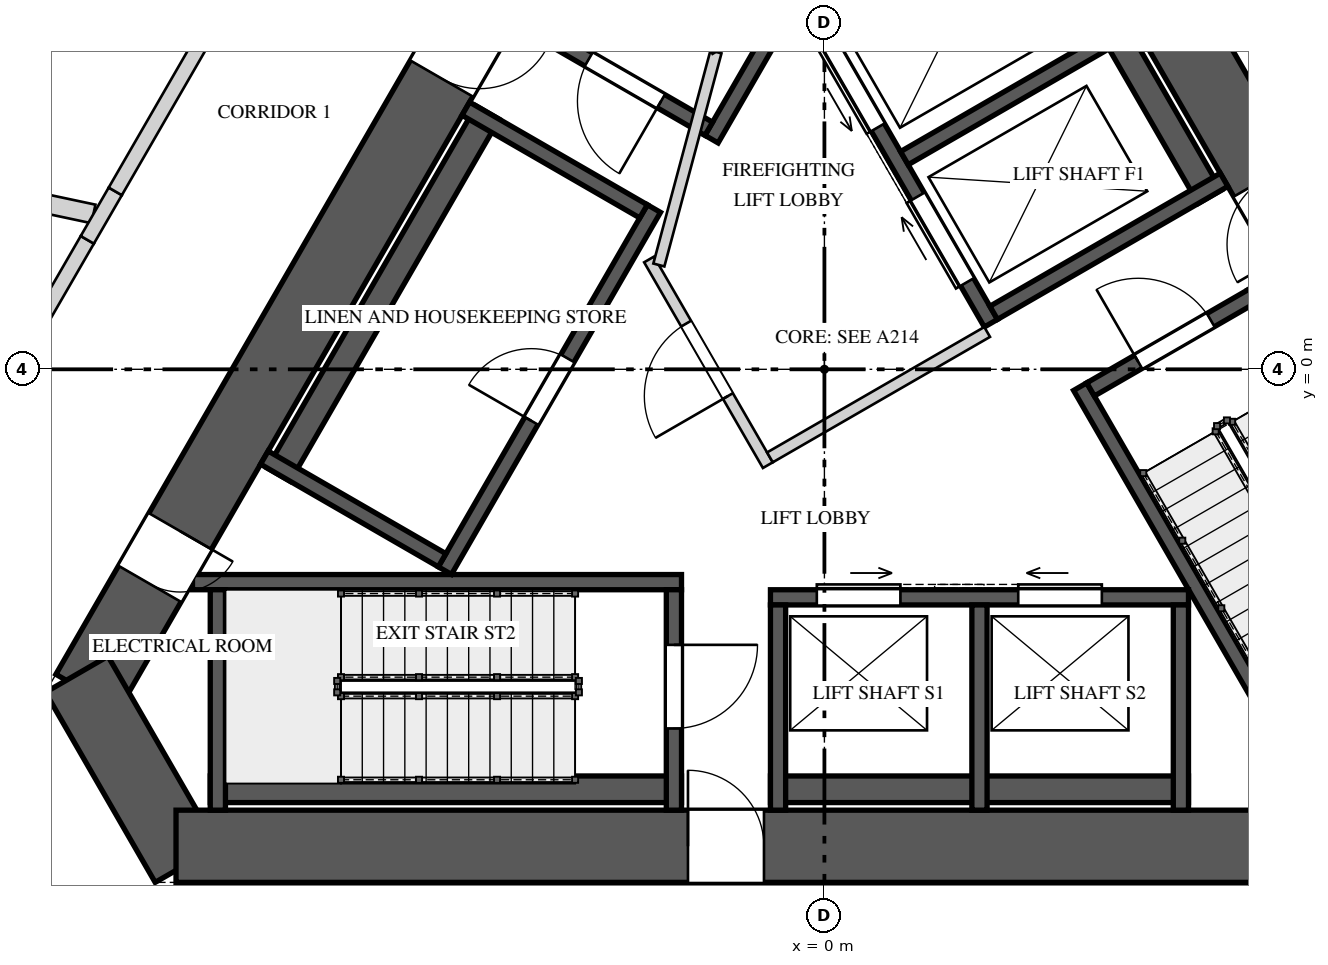
"""IFC4 building model, lengths in metres.
Left out: names, types, materials, properties, quantities, classifications, styles, units other than length and angle.
Written with IfcOpenShell. Run it as: python <this file> out.ifc"""

import sys

from ifc_helpers import new_model, si_unit, direction, frame, frame_2d, origin, place, context, subcontext, project, spatial, rectangle, extrude, element, fill, save


model = new_model("IFC4")
c1 = context("Model", 3, precision=1e-05, world=origin(), true_north=direction((0.0, 1.0)))
c2 = subcontext(c1, "Body", "Model", "MODEL_VIEW")
j1 = project(units=[si_unit("LENGTHUNIT", "METRE"), si_unit("PLANEANGLEUNIT", "RADIAN")], contexts=[c1])
p1 = place(None, origin())
s1 = spatial("IfcSite", under=j1, at=p1, CompositionType="ELEMENT")
p2 = place(p1, origin())
s2 = spatial("IfcBuilding", under=s1, at=p2, CompositionType="ELEMENT")
p3 = place(p2, frame((0.0, 0.0, 88.4)))
s3 = spatial("IfcBuildingStorey", under=s2, at=p3, CompositionType="ELEMENT", Elevation=88.4)
p4 = place(p3, frame((-1.169, 10.525, 0.0), z_axis=(0.0, 0.0, 1.0), x_axis=(-0.499999102847, -0.866025921755, 0.0)))
e1 = element("IfcWall", 1, at=p4, inside=s3, PredefinedType="SHEAR", context=c2, shape_type="SweptSolid", body=[
    extrude(rectangle(XDim=17.061, YDim=0.95, at=frame_2d((8.53, 0.0))), origin(), (0.0, 0.0, 1.0), 4.0),
])
p5 = place(p4, frame((6.735, 0.0, 0.0)))
e2 = element("IfcOpeningElement", 2, at=p5, cuts=e1, PredefinedType="OPENING", context=c2, shape_type="SweptSolid", body=[
    extrude(rectangle(XDim=1.0, YDim=2.4, at=frame_2d((0.5, 1.2))), frame((0.0, 0.485, 0.0), z_axis=(0.0, -1.0, 0.0), x_axis=(1.0, 0.0, 0.0)), (0.0, 0.0, 1.0), 0.97),
])
p6 = place(p4, frame((14.613, 0.0, 0.0)))
e3 = element("IfcOpeningElement", 3, at=p6, cuts=e1, PredefinedType="OPENING", context=c2, shape_type="SweptSolid", body=[
    extrude(rectangle(XDim=0.8, YDim=2.1, at=frame_2d((0.4, 1.05))), frame((0.0, 0.485, 0.0), z_axis=(0.0, -1.0, 0.0), x_axis=(1.0, 0.0, 0.0)), (0.0, 0.0, 1.0), 0.97),
])
p7 = place(p3, frame((-9.837, -4.012, 0.0), z_axis=(0.0, 0.0, 1.0), x_axis=(0.499995765644, -0.866027848477, 0.0)))
e4 = element("IfcWall", 4, at=p7, inside=s3, PredefinedType="SHEAR", context=c2, shape_type="SweptSolid", body=[
    extrude(rectangle(XDim=2.887, YDim=0.95, at=frame_2d((1.443, 0.0))), origin(), (0.0, 0.0, 1.0), 4.0),
])
p8 = place(p3, frame((-8.531, -6.275, 0.0), z_axis=(0.0, 0.0, 1.0), x_axis=(1.0, 0.0, 0.0)))
e5 = element("IfcWall", 5, at=p8, inside=s3, PredefinedType="SHEAR", context=c2, shape_type="SweptSolid", body=[
    extrude(rectangle(XDim=17.061, YDim=0.95, at=frame_2d((8.531, 0.0))), origin(), (0.0, 0.0, 1.0), 4.0),
])
p9 = place(p8, frame((6.735, 0.0, 0.0)))
e6 = element("IfcOpeningElement", 6, at=p9, cuts=e5, PredefinedType="OPENING", context=c2, shape_type="SweptSolid", body=[
    extrude(rectangle(XDim=1.0, YDim=2.4, at=frame_2d((0.5, 1.2))), frame((0.0, 0.485, 0.0), z_axis=(0.0, -1.0, 0.0), x_axis=(1.0, 0.0, 0.0)), (0.0, 0.0, 1.0), 0.97),
])
p10 = place(p3, frame((9.699, -4.25, 0.0), z_axis=(0.0, 0.0, 1.0), x_axis=(-0.499999102847, 0.866025921755, 0.0)))
e7 = element("IfcWall", 7, at=p10, inside=s3, PredefinedType="SHEAR", context=c2, shape_type="SweptSolid", body=[
    extrude(rectangle(XDim=17.061, YDim=0.95, at=frame_2d((8.53, 0.0))), origin(), (0.0, 0.0, 1.0), 4.0),
])
p11 = place(p10, frame((6.805, 0.0, 0.0)))
e8 = element("IfcOpeningElement", 8, at=p11, cuts=e7, PredefinedType="OPENING", context=c2, shape_type="SweptSolid", body=[
    extrude(rectangle(XDim=1.0, YDim=2.4, at=frame_2d((0.5, 1.2))), frame((0.0, 0.485, 0.0), z_axis=(0.0, -1.0, 0.0), x_axis=(1.0, 0.0, 0.0)), (0.0, 0.0, 1.0), 0.97),
])
p12 = place(p3, frame((1.732, 8.6, 0.0), z_axis=(0.0, 0.0, 1.0), x_axis=(-0.499975376872, -0.866039619487, 0.0)))
e9 = element("IfcWall", 9, at=p12, inside=s3, PredefinedType="SOLIDWALL", context=c2, shape_type="SweptSolid", body=[
    extrude(rectangle(XDim=6.434, YDim=0.2, at=frame_2d((3.217, 0.0))), origin(), (0.0, 0.0, 1.0), 3.65),
])
p13 = place(p3, frame((-1.521, 3.165, 0.0), z_axis=(0.0, 0.0, 1.0), x_axis=(-0.866032775405, 0.499987231761, 0.0)))
e10 = element("IfcWall", 10, at=p13, inside=s3, PredefinedType="SOLIDWALL", context=c2, shape_type="SweptSolid", body=[
    extrude(rectangle(XDim=2.9, YDim=0.2, at=frame_2d((1.45, 0.0))), origin(), (0.0, 0.0, 1.0), 3.65),
])
p14 = place(p13, frame((0.725, 0.0, 0.0)))
e11 = element("IfcOpeningElement", 11, at=p14, cuts=e10, PredefinedType="OPENING", context=c2, shape_type="SweptSolid", body=[
    extrude(rectangle(XDim=1.1, YDim=2.4, at=frame_2d((0.55, 1.2))), frame((0.0, 0.11, 0.0), z_axis=(0.0, -1.0, 0.0), x_axis=(1.0, 0.0, 0.0)), (0.0, 0.0, 1.0), 0.22),
])
p15 = place(p3, frame((-8.08, -5.525, 0.0), z_axis=(0.0, 0.0, 1.0), x_axis=(1.0, 0.0, 0.0)))
e12 = element("IfcWall", 12, at=p15, inside=s3, PredefinedType="SOLIDWALL", context=c2, shape_type="SweptSolid", body=[
    extrude(rectangle(XDim=6.2, YDim=0.35, at=frame_2d((3.1, 0.0))), origin(), (0.0, 0.0, 1.0), 3.65),
])
p16 = place(p3, frame((-8.314, -2.8, 0.0), z_axis=(0.0, 0.0, 1.0), x_axis=(1.0, 0.0, 0.0)))
e13 = element("IfcWall", 13, at=p16, inside=s3, PredefinedType="SOLIDWALL", context=c2, shape_type="SweptSolid", body=[
    extrude(rectangle(XDim=6.434, YDim=0.2, at=frame_2d((3.217, 0.0))), origin(), (0.0, 0.0, 1.0), 3.65),
])
p17 = place(p3, frame((-7.98, -2.9, 0.0), z_axis=(0.0, 0.0, 1.0), x_axis=(0.0, -1.0, 0.0)))
e14 = element("IfcWall", 14, at=p17, inside=s3, PredefinedType="SOLIDWALL", context=c2, shape_type="SweptSolid", body=[
    extrude(rectangle(XDim=2.9, YDim=0.2, at=frame_2d((1.45, 0.0))), origin(), (0.0, 0.0, 1.0), 3.65),
])
p18 = place(p3, frame((-1.98, -2.9, 0.0), z_axis=(0.0, 0.0, 1.0), x_axis=(0.0, -1.0, 0.0)))
e15 = element("IfcWall", 15, at=p18, inside=s3, PredefinedType="SOLIDWALL", context=c2, shape_type="SweptSolid", body=[
    extrude(rectangle(XDim=2.9, YDim=0.2, at=frame_2d((1.45, 0.0))), origin(), (0.0, 0.0, 1.0), 3.65),
])
p19 = place(p18, frame((0.725, 0.0, 0.0)))
e16 = element("IfcOpeningElement", 16, at=p19, cuts=e15, PredefinedType="OPENING", context=c2, shape_type="SweptSolid", body=[
    extrude(rectangle(XDim=1.1, YDim=2.4, at=frame_2d((0.55, 1.2))), frame((0.0, 0.11, 0.0), z_axis=(0.0, -1.0, 0.0), x_axis=(1.0, 0.0, 0.0)), (0.0, 0.0, 1.0), 0.22),
])
p20 = place(p3, frame((8.825, -4.235, 0.0), z_axis=(0.0, 0.0, 1.0), x_axis=(-0.499997426962, 0.866026889324, 0.0)))
e17 = element("IfcWall", 17, at=p20, inside=s3, PredefinedType="SOLIDWALL", context=c2, shape_type="SweptSolid", body=[
    extrude(rectangle(XDim=6.2, YDim=0.35, at=frame_2d((3.1, 0.0))), origin(), (0.0, 0.0, 1.0), 3.65),
])
p21 = place(p3, frame((6.582, -5.8, 0.0), z_axis=(0.0, 0.0, 1.0), x_axis=(-0.499975376872, 0.866039619487, 0.0)))
e18 = element("IfcWall", 18, at=p21, inside=s3, PredefinedType="SOLIDWALL", context=c2, shape_type="SweptSolid", body=[
    extrude(rectangle(XDim=6.434, YDim=0.2, at=frame_2d((3.217, 0.0))), origin(), (0.0, 0.0, 1.0), 3.65),
])
p22 = place(p3, frame((3.501, -0.265, 0.0), z_axis=(0.0, 0.0, 1.0), x_axis=(0.866032775405, 0.499987231761, 0.0)))
e19 = element("IfcWall", 19, at=p22, inside=s3, PredefinedType="SOLIDWALL", context=c2, shape_type="SweptSolid", body=[
    extrude(rectangle(XDim=2.9, YDim=0.2, at=frame_2d((1.45, 0.0))), origin(), (0.0, 0.0, 1.0), 3.65),
])
p23 = place(p22, frame((0.725, 0.0, 0.0)))
e20 = element("IfcOpeningElement", 20, at=p23, cuts=e19, PredefinedType="OPENING", context=c2, shape_type="SweptSolid", body=[
    extrude(rectangle(XDim=1.1, YDim=2.4, at=frame_2d((0.55, 1.2))), frame((0.0, 0.11, 0.0), z_axis=(0.0, -1.0, 0.0), x_axis=(1.0, 0.0, 0.0)), (0.0, 0.0, 1.0), 0.22),
])
p24 = place(p3, frame((-4.993, -2.648, 0.0), z_axis=(0.0, 0.0, 1.0), x_axis=(0.499996545922, 0.866027397988, 0.0)))
e21 = element("IfcWall", 21, at=p24, inside=s3, PredefinedType="SOLIDWALL", context=c2, shape_type="SweptSolid", body=[
    extrude(rectangle(XDim=5.5, YDim=0.2, at=frame_2d((2.75, 0.0))), origin(), (0.0, 0.0, 1.0), 3.65),
])
p25 = place(p24, frame((2.275, 0.0, 0.0)))
e22 = element("IfcOpeningElement", 22, at=p25, cuts=e21, PredefinedType="OPENING", context=c2, shape_type="SweptSolid", body=[
    extrude(rectangle(XDim=0.95, YDim=2.4, at=frame_2d((0.475, 1.2))), frame((0.0, 0.11, 0.0), z_axis=(0.0, -1.0, 0.0), x_axis=(1.0, 0.0, 0.0)), (0.0, 0.0, 1.0), 0.22),
])
p26 = place(p3, frame((-4.43, 3.377, 0.0), z_axis=(0.0, 0.0, 1.0), x_axis=(-0.499996545922, -0.866027397988, 0.0)))
e23 = element("IfcWall", 23, at=p26, inside=s3, PredefinedType="SOLIDWALL", context=c2, shape_type="SweptSolid", body=[
    extrude(rectangle(XDim=5.5, YDim=0.35, at=frame_2d((2.75, 0.0))), origin(), (0.0, 0.0, 1.0), 3.65),
])
for number, where, z_axis, x_axis in (
    (24, (-2.38, 2.078, 0.0), (0.0, 0.0, 1.0), (-0.866, 0.5, 0.0)),
    (25, (-5.03, -2.512, 0.0), (0.0, 0.0, 1.0), (-0.866, 0.5, 0.0)),
):
    element("IfcWall", number, at=place(p3, frame(where, z_axis=z_axis, x_axis=x_axis)), inside=s3, PredefinedType="SOLIDWALL", context=c2, shape_type="SweptSolid", body=[
        extrude(rectangle(XDim=2.7, YDim=0.2, at=frame_2d((1.35, 0.0))), origin(), (0.0, 0.0, 1.0), 3.65),
    ])
p27 = place(p3, frame((-0.71, -3.0, 0.0), z_axis=(0.0, 0.0, 1.0), x_axis=(1.0, 0.0, 0.0)))
e26 = element("IfcWall", 26, at=p27, inside=s3, PredefinedType="SOLIDWALL", context=c2, shape_type="SweptSolid", body=[
    extrude(rectangle(XDim=5.5, YDim=0.2, at=frame_2d((2.75, 0.0))), origin(), (0.0, 0.0, 1.0), 3.65),
])
p28 = place(p27, frame((0.61, 0.0, 0.0)))
e27 = element("IfcOpeningElement", 27, at=p28, cuts=e26, PredefinedType="OPENING", context=c2, shape_type="SweptSolid", body=[
    extrude(rectangle(XDim=1.1, YDim=2.1, at=frame_2d((0.55, 1.05))), frame((0.0, 0.11, 0.0), z_axis=(0.0, -1.0, 0.0), x_axis=(1.0, 0.0, 0.0)), (0.0, 0.0, 1.0), 0.22),
])
p29 = place(p27, frame((3.26, 0.0, 0.0)))
e28 = element("IfcOpeningElement", 28, at=p29, cuts=e26, PredefinedType="OPENING", context=c2, shape_type="SweptSolid", body=[
    extrude(rectangle(XDim=1.1, YDim=2.1, at=frame_2d((0.55, 1.05))), frame((0.0, 0.11, 0.0), z_axis=(0.0, -1.0, 0.0), x_axis=(1.0, 0.0, 0.0)), (0.0, 0.0, 1.0), 0.22),
])
p30 = place(p3, frame((-0.71, -5.525, 0.0), z_axis=(0.0, 0.0, 1.0), x_axis=(1.0, 0.0, 0.0)))
e29 = element("IfcWall", 29, at=p30, inside=s3, PredefinedType="SOLIDWALL", context=c2, shape_type="SweptSolid", body=[
    extrude(rectangle(XDim=5.5, YDim=0.35, at=frame_2d((2.75, 0.0))), origin(), (0.0, 0.0, 1.0), 3.65),
])
for number, where, z_axis, x_axis in (
    (30, (-0.61, -3.1, 0.0), (0.0, 0.0, 1.0), (0.0, -1.0, 0.0)),
    (31, (2.04, -3.1, 0.0), (0.0, 0.0, 1.0), (0.0, -1.0, 0.0)),
    (32, (4.69, -3.1, 0.0), (0.0, 0.0, 1.0), (0.0, -1.0, 0.0)),
):
    element("IfcWall", number, at=place(p3, frame(where, z_axis=z_axis, x_axis=x_axis)), inside=s3, PredefinedType="SOLIDWALL", context=c2, shape_type="SweptSolid", body=[
        extrude(rectangle(XDim=2.7, YDim=0.2, at=frame_2d((1.35, 0.0))), origin(), (0.0, 0.0, 1.0), 3.65),
    ])
p31 = place(p3, frame((2.19, 0.606, 0.0), z_axis=(0.0, 0.0, 1.0), x_axis=(-0.500002801628, 0.866023786258, 0.0)))
e33 = element("IfcWall", 33, at=p31, inside=s3, PredefinedType="SOLIDWALL", context=c2, shape_type="SweptSolid", body=[
    extrude(rectangle(XDim=4.9, YDim=0.2, at=frame_2d((2.45, 0.0))), origin(), (0.0, 0.0, 1.0), 3.65),
])
p32 = place(p31, frame((0.625, 0.0, 0.0)))
e34 = element("IfcOpeningElement", 34, at=p32, cuts=e33, PredefinedType="OPENING", context=c2, shape_type="SweptSolid", body=[
    extrude(rectangle(XDim=1.3, YDim=2.1, at=frame_2d((0.65, 1.05))), frame((0.0, 0.11, 0.0), z_axis=(0.0, -1.0, 0.0), x_axis=(1.0, 0.0, 0.0)), (0.0, 0.0, 1.0), 0.22),
])
p33 = place(p31, frame((2.975, 0.0, 0.0)))
e35 = element("IfcOpeningElement", 35, at=p33, cuts=e33, PredefinedType="OPENING", context=c2, shape_type="SweptSolid", body=[
    extrude(rectangle(XDim=1.3, YDim=2.1, at=frame_2d((0.65, 1.05))), frame((0.0, 0.11, 0.0), z_axis=(0.0, -1.0, 0.0), x_axis=(1.0, 0.0, 0.0)), (0.0, 0.0, 1.0), 0.22),
])
p34 = place(p3, frame((5.07, 2.269, 0.0), z_axis=(0.0, 0.0, 1.0), x_axis=(-0.49998122708, 0.866036242063, 0.0)))
e36 = element("IfcWall", 36, at=p34, inside=s3, PredefinedType="SOLIDWALL", context=c2, shape_type="SweptSolid", body=[
    extrude(rectangle(XDim=4.9, YDim=0.35, at=frame_2d((2.45, 0.0))), origin(), (0.0, 0.0, 1.0), 3.65),
])
for number, where, z_axis, x_axis in (
    (37, (2.227, 0.743, 0.0), (0.0, 0.0, 1.0), (0.866, 0.5, 0.0)),
    (38, (1.052, 2.778, 0.0), (0.0, 0.0, 1.0), (0.866, 0.5, 0.0)),
):
    element("IfcWall", number, at=place(p3, frame(where, z_axis=z_axis, x_axis=x_axis)), inside=s3, PredefinedType="SOLIDWALL", context=c2, shape_type="SweptSolid", body=[
        extrude(rectangle(XDim=3.5, YDim=0.2, at=frame_2d((1.75, 0.0))), origin(), (0.0, 0.0, 1.0), 3.65),
    ])
p35 = place(p3, frame((-0.744, -1.261, 0.0), z_axis=(0.0, 0.0, 1.0), x_axis=(-0.500004234368, 0.866022959057, 0.0)))
e39 = element("IfcWall", 39, at=p35, inside=s3, PredefinedType="PARTITIONING", context=c2, shape_type="SweptSolid", body=[
    extrude(rectangle(XDim=3.125, YDim=0.15, at=frame_2d((1.562, 0.0))), origin(), (0.0, 0.0, 1.0), 3.65),
])
p36 = place(p35, frame((1.05, 0.0, 0.0)))
e40 = element("IfcOpeningElement", 40, at=p36, cuts=e39, PredefinedType="OPENING", context=c2, shape_type="SweptSolid", body=[
    extrude(rectangle(XDim=1.1, YDim=2.4, at=frame_2d((0.55, 1.2))), frame((0.0, 0.085, 0.0), z_axis=(0.0, -1.0, 0.0), x_axis=(1.0, 0.0, 0.0)), (0.0, 0.0, 1.0), 0.17),
])
p37 = place(p3, frame((-0.717, -1.159, 0.0), z_axis=(0.0, 0.0, 1.0), x_axis=(0.866008176907, 0.50002983664, 0.0)))
e41 = element("IfcWall", 41, at=p37, inside=s3, PredefinedType="PARTITIONING", context=c2, shape_type="SweptSolid", body=[
    extrude(rectangle(XDim=3.3, YDim=0.15, at=frame_2d((1.65, 0.0))), origin(), (0.0, 0.0, 1.0), 3.65),
])
p38 = place(p3, frame((-2.178, 1.372, 0.0), z_axis=(0.0, 0.0, 1.0), x_axis=(0.258808958833, 0.96592852884, 0.0)))
e42 = element("IfcWall", 42, at=p38, inside=s3, PredefinedType="PARTITIONING", context=c2, shape_type="SweptSolid", body=[
    extrude(rectangle(XDim=2.903, YDim=0.15, at=frame_2d((1.451, 0.0))), origin(), (0.0, 0.0, 1.0), 3.65),
])
p39 = place(p3, frame((-1.51, 4.215, 0.0), z_axis=(0.0, 0.0, 1.0), x_axis=(0.866085525409, 0.49989585183, 0.0)))
e43 = element("IfcWall", 43, at=p39, inside=s3, PredefinedType="PARTITIONING", context=c2, shape_type="SweptSolid", body=[
    extrude(rectangle(XDim=1.3, YDim=0.15, at=frame_2d((0.65, 0.0))), origin(), (0.0, 0.0, 1.0), 3.65),
])
p40 = place(p3, frame((-11.496, 2.789, 0.0), z_axis=(0.0, 0.0, 1.0), x_axis=(0.499983361514, 0.866035009806, 0.0)))
e44 = element("IfcWall", 44, at=p40, inside=s3, PredefinedType="PARTITIONING", context=c2, shape_type="SweptSolid", body=[
    extrude(rectangle(XDim=4.59, YDim=0.15, at=frame_2d((2.295, 0.0))), origin(), (0.0, 0.0, 1.0), 3.65),
])
p41 = place(p40, frame((1.9, 0.0, 0.0)))
e45 = element("IfcOpeningElement", 45, at=p41, cuts=e44, PredefinedType="OPENING", context=c2, shape_type="SweptSolid", body=[
    extrude(rectangle(XDim=0.95, YDim=2.4, at=frame_2d((0.475, 1.2))), frame((0.0, 0.085, 0.0), z_axis=(0.0, -1.0, 0.0), x_axis=(1.0, 0.0, 0.0)), (0.0, 0.0, 1.0), 0.17),
])
p42 = place(p3, frame((-9.616, 2.044, 0.0), z_axis=(0.0, 0.0, 1.0), x_axis=(-0.978148093834, 0.207909370951, 0.0)))
e46 = element("IfcWall", 46, at=p42, inside=s3, PredefinedType="SOLIDWALL", context=c2, shape_type="SweptSolid", body=[
    extrude(rectangle(XDim=7.269, YDim=0.25, at=frame_2d((3.634, 0.0))), origin(), (0.0, 0.0, 1.0), 2.95),
])
p43 = place(p3, frame((-12.274, -2.76, 0.0), z_axis=(0.0, 0.0, 1.0), x_axis=(0.500001317485, 0.866024643133, 0.0)))
e47 = element("IfcWall", 47, at=p43, inside=s3, PredefinedType="SOLIDWALL", context=c2, shape_type="SweptSolid", body=[
    extrude(rectangle(XDim=5.153, YDim=0.2, at=frame_2d((2.577, 0.0))), origin(), (0.0, 0.0, 1.0), 3.65),
])
p44 = place(p3, frame((-9.698, 1.703, 0.0), z_axis=(0.0, 0.0, 1.0), x_axis=(0.499885169746, 0.866091690913, 0.0)))
e48 = element("IfcWall", 48, at=p44, inside=s3, PredefinedType="SOLIDWALL", context=c2, shape_type="SweptSolid", body=[
    extrude(rectangle(XDim=0.736, YDim=0.2, at=frame_2d((0.368, 0.0))), origin(), (0.0, 0.0, 1.0), 2.95),
])
p45 = place(p3, frame((-9.33, 2.341, 0.0), z_axis=(0.0, 0.0, 1.0), x_axis=(0.500029679218, 0.866008267802, 0.0)))
e49 = element("IfcWall", 49, at=p45, inside=s3, PredefinedType="SOLIDWALL", context=c2, shape_type="SweptSolid", body=[
    extrude(rectangle(XDim=3.577, YDim=0.2, at=frame_2d((1.789, 0.0))), origin(), (0.0, 0.0, 1.0), 3.65),
])
p46 = place(p14, origin())
e50 = element("IfcDoor", 50, at=p46, inside=s3, OperationType="SINGLE_SWING_RIGHT", PredefinedType="DOOR", context=c2, shape_type="SweptSolid", body=[
    extrude(rectangle(XDim=1.1, YDim=2.4, at=frame_2d((0.55, 1.2))), frame((0.0, 0.025, 0.0), z_axis=(0.0, -1.0, 0.0), x_axis=(1.0, 0.0, 0.0)), (0.0, 0.0, 1.0), 0.05),
])
fill(e11, e50)
p47 = place(p19, origin())
e51 = element("IfcDoor", 51, at=p47, inside=s3, OperationType="SINGLE_SWING_LEFT", PredefinedType="DOOR", context=c2, shape_type="SweptSolid", body=[
    extrude(rectangle(XDim=1.1, YDim=2.4, at=frame_2d((0.55, 1.2))), frame((0.0, 0.025, 0.0), z_axis=(0.0, -1.0, 0.0), x_axis=(1.0, 0.0, 0.0)), (0.0, 0.0, 1.0), 0.05),
])
fill(e16, e51)
p48 = place(p23, origin())
e52 = element("IfcDoor", 52, at=p48, inside=s3, OperationType="SINGLE_SWING_RIGHT", PredefinedType="DOOR", context=c2, shape_type="SweptSolid", body=[
    extrude(rectangle(XDim=1.1, YDim=2.4, at=frame_2d((0.55, 1.2))), frame((0.0, 0.025, 0.0), z_axis=(0.0, -1.0, 0.0), x_axis=(1.0, 0.0, 0.0)), (0.0, 0.0, 1.0), 0.05),
])
fill(e20, e52)
p49 = place(p25, origin())
e53 = element("IfcDoor", 53, at=p49, inside=s3, OperationType="SINGLE_SWING_LEFT", PredefinedType="DOOR", context=c2, shape_type="SweptSolid", body=[
    extrude(rectangle(XDim=0.95, YDim=2.4, at=frame_2d((0.475, 1.2))), frame((0.0, 0.025, 0.0), z_axis=(0.0, -1.0, 0.0), x_axis=(1.0, 0.0, 0.0)), (0.0, 0.0, 1.0), 0.05),
])
fill(e22, e53)
p50 = place(p28, origin())
e54 = element("IfcDoor", 54, at=p50, inside=s3, OperationType="SLIDING_TO_RIGHT", PredefinedType="DOOR", context=c2, shape_type="SweptSolid", body=[
    extrude(rectangle(XDim=1.1, YDim=2.1, at=frame_2d((0.55, 1.05))), frame((0.0, 0.025, 0.0), z_axis=(0.0, -1.0, 0.0), x_axis=(1.0, 0.0, 0.0)), (0.0, 0.0, 1.0), 0.05),
])
fill(e27, e54)
p51 = place(p29, origin())
e55 = element("IfcDoor", 55, at=p51, inside=s3, OperationType="SLIDING_TO_LEFT", PredefinedType="DOOR", context=c2, shape_type="SweptSolid", body=[
    extrude(rectangle(XDim=1.1, YDim=2.1, at=frame_2d((0.55, 1.05))), frame((0.0, 0.025, 0.0), z_axis=(0.0, -1.0, 0.0), x_axis=(1.0, 0.0, 0.0)), (0.0, 0.0, 1.0), 0.05),
])
fill(e28, e55)
p52 = place(p32, origin())
e56 = element("IfcDoor", 56, at=p52, inside=s3, OperationType="SLIDING_TO_RIGHT", PredefinedType="DOOR", context=c2, shape_type="SweptSolid", body=[
    extrude(rectangle(XDim=1.3, YDim=2.1, at=frame_2d((0.65, 1.05))), frame((0.0, 0.025, 0.0), z_axis=(0.0, -1.0, 0.0), x_axis=(1.0, 0.0, 0.0)), (0.0, 0.0, 1.0), 0.05),
])
fill(e34, e56)
p53 = place(p33, origin())
e57 = element("IfcDoor", 57, at=p53, inside=s3, OperationType="SLIDING_TO_LEFT", PredefinedType="DOOR", context=c2, shape_type="SweptSolid", body=[
    extrude(rectangle(XDim=1.3, YDim=2.1, at=frame_2d((0.65, 1.05))), frame((0.0, 0.025, 0.0), z_axis=(0.0, -1.0, 0.0), x_axis=(1.0, 0.0, 0.0)), (0.0, 0.0, 1.0), 0.05),
])
fill(e35, e57)
p54 = place(p36, origin())
e58 = element("IfcDoor", 58, at=p54, inside=s3, OperationType="SINGLE_SWING_RIGHT", PredefinedType="DOOR", context=c2, shape_type="SweptSolid", body=[
    extrude(rectangle(XDim=1.1, YDim=2.4, at=frame_2d((0.55, 1.2))), frame((0.0, 0.025, 0.0), z_axis=(0.0, -1.0, 0.0), x_axis=(1.0, 0.0, 0.0)), (0.0, 0.0, 1.0), 0.05),
])
fill(e40, e58)
p55 = place(p5, origin())
e59 = element("IfcDoor", 59, at=p55, inside=s3, OperationType="SINGLE_SWING_LEFT", PredefinedType="DOOR", context=c2, shape_type="SweptSolid", body=[
    extrude(rectangle(XDim=1.0, YDim=2.4, at=frame_2d((0.5, 1.2))), frame((0.0, 0.025, 0.0), z_axis=(0.0, -1.0, 0.0), x_axis=(1.0, 0.0, 0.0)), (0.0, 0.0, 1.0), 0.05),
])
fill(e2, e59)
p56 = place(p9, origin())
e60 = element("IfcDoor", 60, at=p56, inside=s3, OperationType="SINGLE_SWING_RIGHT", PredefinedType="DOOR", context=c2, shape_type="SweptSolid", body=[
    extrude(rectangle(XDim=1.0, YDim=2.4, at=frame_2d((0.5, 1.2))), frame((0.0, 0.025, 0.0), z_axis=(0.0, -1.0, 0.0), x_axis=(1.0, 0.0, 0.0)), (0.0, 0.0, 1.0), 0.05),
])
fill(e6, e60)
p57 = place(p6, origin())
e61 = element("IfcDoor", 61, at=p57, inside=s3, OperationType="SINGLE_SWING_RIGHT", PredefinedType="DOOR", context=c2, shape_type="SweptSolid", body=[
    extrude(rectangle(XDim=0.8, YDim=2.1, at=frame_2d((0.4, 1.05))), frame((0.0, 0.025, 0.0), z_axis=(0.0, -1.0, 0.0), x_axis=(1.0, 0.0, 0.0)), (0.0, 0.0, 1.0), 0.05),
])
fill(e3, e61)
save(model, sys.argv[1])
